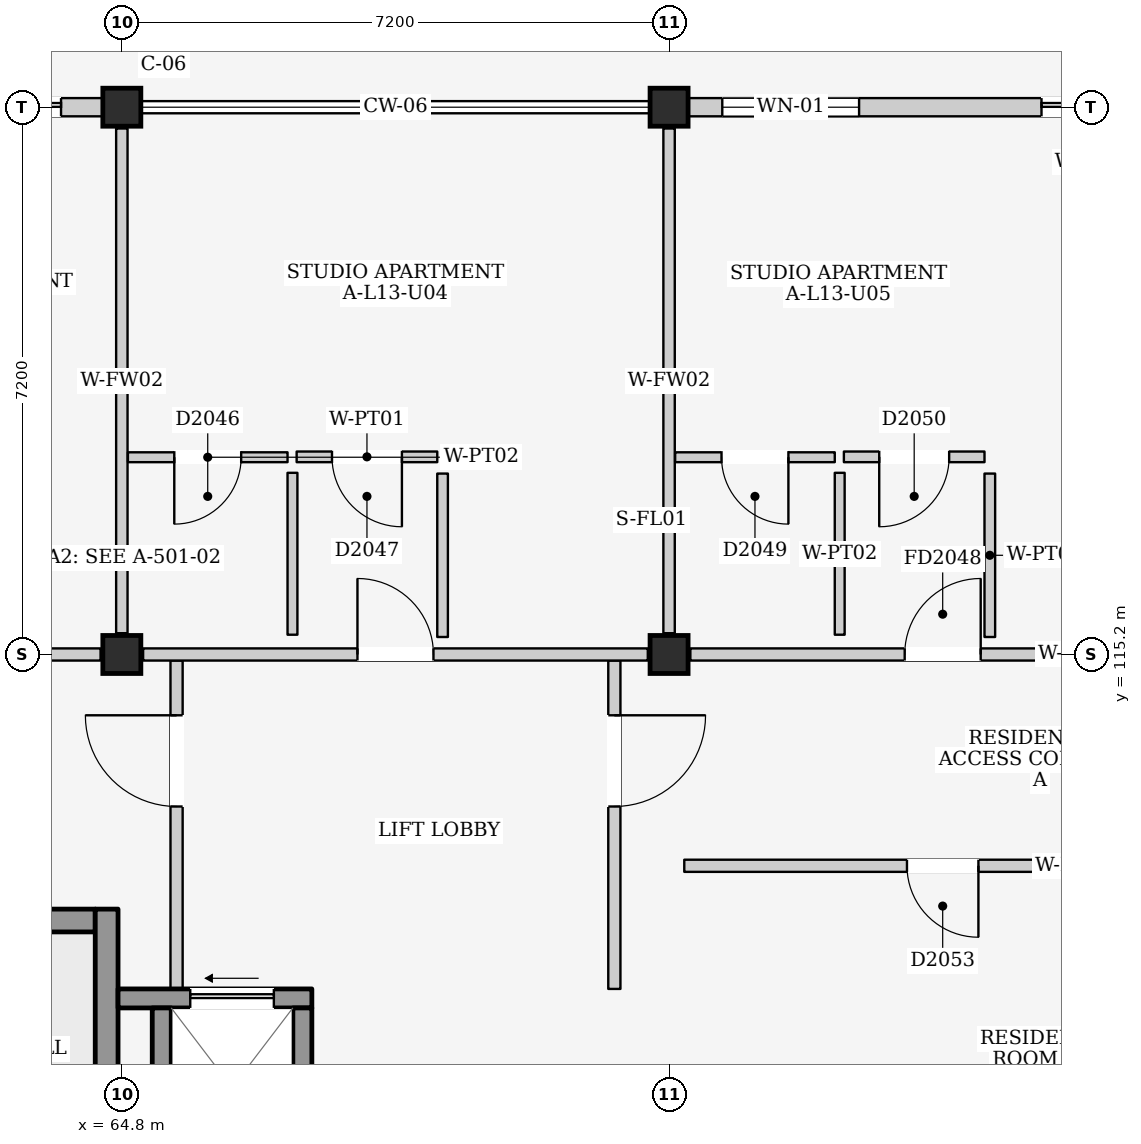
"""IFC4 building model, lengths in metres.
Left out: names, types, materials, properties, quantities, classifications, styles, units other than length and angle.
Written with IfcOpenShell. Run it as: python <this file> out.ifc"""

import sys

from ifc_helpers import new_model, si_unit, direction, frame, frame_2d, origin, origin_2d, place, context, subcontext, project, spatial, rectangle, extrude, element, fill, save


model = new_model("IFC4")
c1 = context("Model", 3, precision=1e-05, world=origin(), true_north=direction((0.0, 1.0)))
c2 = subcontext(c1, "Body", "Model", "MODEL_VIEW")
j1 = project(units=[si_unit("LENGTHUNIT", "METRE"), si_unit("PLANEANGLEUNIT", "RADIAN")], contexts=[c1])
p1 = place(None, origin())
s1 = spatial("IfcSite", under=j1, at=p1, CompositionType="ELEMENT")
p2 = place(p1, origin())
s2 = spatial("IfcBuilding", under=s1, at=p2, CompositionType="ELEMENT")
p3 = place(p2, frame((0.0, 0.0, 44.4)))
s3 = spatial("IfcBuildingStorey", under=s2, at=p3, CompositionType="ELEMENT", Elevation=44.4)
for number, where, z_axis, x_axis in (
    (1, (64.8, 115.2, 0.0), (0.0, 0.0, 1.0), (1.0, 0.0, 0.0)),
    (2, (64.8, 122.4, 0.0), (0.0, 0.0, 1.0), (1.0, 0.0, 0.0)),
    (3, (72.0, 115.2, 0.0), (0.0, 0.0, 1.0), (1.0, 0.0, 0.0)),
    (4, (72.0, 122.4, 0.0), (0.0, 0.0, 1.0), (1.0, 0.0, 0.0)),
):
    element("IfcColumn", number, at=place(p3, frame(where, z_axis=z_axis, x_axis=x_axis)), inside=s3, PredefinedType="COLUMN", context=c2, shape_type="SweptSolid", body=[
        extrude(rectangle(XDim=0.5, YDim=0.5, at=origin_2d()), origin(), (0.0, 0.0, 1.0), 3.3),
    ])
p4 = place(p3, frame((57.85, 122.4, 0.0), z_axis=(0.0, 0.0, 1.0), x_axis=(1.0, 0.0, 0.0)))
e5 = element("IfcWall", 5, at=p4, inside=s3, PredefinedType="ELEMENTEDWALL", context=c2, shape_type="SweptSolid", body=[
    extrude(rectangle(XDim=6.7, YDim=0.24, at=frame_2d((3.35, 0.0))), origin(), (0.0, 0.0, 1.0), 2.615),
])
p5 = place(p4, frame((4.35, 0.0, 0.0)))
e6 = element("IfcOpeningElement", 6, at=p5, cuts=e5, PredefinedType="OPENING", context=c2, shape_type="SweptSolid", body=[
    extrude(rectangle(XDim=1.8, YDim=2.12, at=frame_2d((0.9, 1.06))), frame((0.0, 0.135, 0.0), z_axis=(0.0, -1.0, 0.0), x_axis=(1.0, 0.0, 0.0)), (0.0, 0.0, 1.0), 0.27),
])
p6 = place(p4, frame((0.45, 0.0, 0.9)))
e7 = element("IfcOpeningElement", 7, at=p6, cuts=e5, PredefinedType="OPENING", context=c2, shape_type="SweptSolid", body=[
    extrude(rectangle(XDim=2.05, YDim=1.6, at=frame_2d((1.025, 0.8))), frame((0.0, 0.135, 0.0), z_axis=(0.0, -1.0, 0.0), x_axis=(1.0, 0.0, 0.0)), (0.0, 0.0, 1.0), 0.27),
])
p7 = place(p3, frame((72.25, 122.4, 0.0), z_axis=(0.0, 0.0, 1.0), x_axis=(1.0, 0.0, 0.0)))
e8 = element("IfcWall", 8, at=p7, inside=s3, PredefinedType="ELEMENTEDWALL", context=c2, shape_type="SweptSolid", body=[
    extrude(rectangle(XDim=6.7, YDim=0.24, at=frame_2d((3.35, 0.0))), origin(), (0.0, 0.0, 1.0), 2.615),
])
p8 = place(p7, frame((4.65, 0.0, 0.0)))
e9 = element("IfcOpeningElement", 9, at=p8, cuts=e8, PredefinedType="OPENING", context=c2, shape_type="SweptSolid", body=[
    extrude(rectangle(XDim=1.5, YDim=2.12, at=frame_2d((0.75, 1.06))), frame((0.0, 0.135, 0.0), z_axis=(0.0, -1.0, 0.0), x_axis=(1.0, 0.0, 0.0)), (0.0, 0.0, 1.0), 0.27),
])
p9 = place(p7, frame((0.45, 0.0, 0.9)))
e10 = element("IfcOpeningElement", 10, at=p9, cuts=e8, PredefinedType="OPENING", context=c2, shape_type="SweptSolid", body=[
    extrude(rectangle(XDim=1.8, YDim=1.5, at=frame_2d((0.9, 0.75))), frame((0.0, 0.135, 0.0), z_axis=(0.0, -1.0, 0.0), x_axis=(1.0, 0.0, 0.0)), (0.0, 0.0, 1.0), 0.27),
])
p10 = place(p3, frame((57.95, 111.7, 0.0), z_axis=(0.0, 0.0, 1.0), x_axis=(1.0, 0.0, 0.0)))
e11 = element("IfcWall", 11, at=p10, inside=s3, PredefinedType="SHEAR", context=c2, shape_type="SweptSolid", body=[
    extrude(rectangle(XDim=6.5, YDim=0.3, at=frame_2d((3.25, 0.0))), origin(), (0.0, 0.0, 1.0), 3.08),
])
p11 = place(p10, frame((0.18, 0.0, 0.0)))
e12 = element("IfcOpeningElement", 12, at=p11, cuts=e11, PredefinedType="OPENING", context=c2, shape_type="SweptSolid", body=[
    extrude(rectangle(XDim=1.15, YDim=2.2, at=frame_2d((0.575, 1.1))), frame((0.0, 0.165, 0.0), z_axis=(0.0, -1.0, 0.0), x_axis=(1.0, 0.0, 0.0)), (0.0, 0.0, 1.0), 0.33),
])
p12 = place(p3, frame((64.6, 108.15, 0.0), z_axis=(0.0, 0.0, 1.0), x_axis=(0.0, 1.0, 0.0)))
e13 = element("IfcWall", 13, at=p12, inside=s3, PredefinedType="SHEAR", context=c2, shape_type="SweptSolid", body=[
    extrude(rectangle(XDim=3.7, YDim=0.3, at=frame_2d((1.85, 0.0))), origin(), (0.0, 0.0, 1.0), 3.08),
])
p13 = place(p3, frame((65.52, 110.8, 0.0), z_axis=(0.0, 0.0, 1.0), x_axis=(0.0, 1.0, 0.0)))
e14 = element("IfcWall", 14, at=p13, inside=s3, PredefinedType="PARTITIONING", context=c2, shape_type="SweptSolid", body=[
    extrude(rectangle(XDim=4.32, YDim=0.16, at=frame_2d((2.16, 0.0))), origin(), (0.0, 0.0, 1.0), 3.08),
])
p14 = place(p13, frame((2.4, 0.0, 0.0)))
e15 = element("IfcOpeningElement", 15, at=p14, cuts=e14, PredefinedType="OPENING", context=c2, shape_type="SweptSolid", body=[
    extrude(rectangle(XDim=1.2, YDim=2.2, at=frame_2d((0.6, 1.1))), frame((0.0, 0.095, 0.0), z_axis=(0.0, -1.0, 0.0), x_axis=(1.0, 0.0, 0.0)), (0.0, 0.0, 1.0), 0.19),
])
p15 = place(p3, frame((71.28, 110.8, 0.0), z_axis=(0.0, 0.0, 1.0), x_axis=(0.0, 1.0, 0.0)))
e16 = element("IfcWall", 16, at=p15, inside=s3, PredefinedType="PARTITIONING", context=c2, shape_type="SweptSolid", body=[
    extrude(rectangle(XDim=4.32, YDim=0.16, at=frame_2d((2.16, 0.0))), origin(), (0.0, 0.0, 1.0), 3.08),
])
p16 = place(p15, frame((2.4, 0.0, 0.0)))
e17 = element("IfcOpeningElement", 17, at=p16, cuts=e16, PredefinedType="OPENING", context=c2, shape_type="SweptSolid", body=[
    extrude(rectangle(XDim=1.2, YDim=2.2, at=frame_2d((0.6, 1.1))), frame((0.0, 0.095, 0.0), z_axis=(0.0, -1.0, 0.0), x_axis=(1.0, 0.0, 0.0)), (0.0, 0.0, 1.0), 0.19),
])
p17 = place(p3, frame((64.75, 110.675, 0.0), z_axis=(0.0, 0.0, 1.0), x_axis=(1.0, 0.0, 0.0)))
e18 = element("IfcWall", 18, at=p17, inside=s3, PredefinedType="SHEAR", context=c2, shape_type="SweptSolid", body=[
    extrude(rectangle(XDim=2.55, YDim=0.25, at=frame_2d((1.275, 0.0))), origin(), (0.0, 0.0, 1.0), 3.08),
])
p18 = place(p17, frame((0.95, 0.0, 0.0)))
e19 = element("IfcOpeningElement", 19, at=p18, cuts=e18, PredefinedType="OPENING", context=c2, shape_type="SweptSolid", body=[
    extrude(rectangle(XDim=1.1, YDim=2.15, at=frame_2d((0.55, 1.075))), frame((0.0, 0.14, 0.0), z_axis=(0.0, -1.0, 0.0), x_axis=(1.0, 0.0, 0.0)), (0.0, 0.0, 1.0), 0.28),
])
for number, where, z_axis, x_axis in (
    (20, (65.325, 108.45, 0.0), (0.0, 0.0, 1.0), (0.0, 1.0, 0.0)),
    (21, (67.175, 108.45, 0.0), (0.0, 0.0, 1.0), (0.0, 1.0, 0.0)),
):
    element("IfcWall", number, at=place(p3, frame(where, z_axis=z_axis, x_axis=x_axis)), inside=s3, PredefinedType="SHEAR", context=c2, shape_type="SweptSolid", body=[
        extrude(rectangle(XDim=2.1, YDim=0.25, at=frame_2d((1.05, 0.0))), origin(), (0.0, 0.0, 1.0), 3.08),
    ])
p19 = place(p3, frame((57.88, 115.2, 0.0), z_axis=(0.0, 0.0, 1.0), x_axis=(1.0, 0.0, 0.0)))
e22 = element("IfcWall", 22, at=p19, inside=s3, PredefinedType="PARTITIONING", context=c2, shape_type="SweptSolid", body=[
    extrude(rectangle(XDim=6.64, YDim=0.16, at=frame_2d((3.32, 0.0))), origin(), (0.0, 0.0, 1.0), 2.415),
])
p20 = place(p19, frame((2.82, 0.0, 0.0)))
e23 = element("IfcOpeningElement", 23, at=p20, cuts=e22, PredefinedType="OPENING", context=c2, shape_type="SweptSolid", body=[
    extrude(rectangle(XDim=1.0, YDim=2.15, at=frame_2d((0.5, 1.075))), frame((0.0, 0.095, 0.0), z_axis=(0.0, -1.0, 0.0), x_axis=(1.0, 0.0, 0.0)), (0.0, 0.0, 1.0), 0.19),
])
p21 = place(p3, frame((64.8, 115.48, 0.0), z_axis=(0.0, 0.0, 1.0), x_axis=(0.0, 1.0, 0.0)))
e24 = element("IfcWall", 24, at=p21, inside=s3, PredefinedType="PARTITIONING", context=c2, shape_type="SweptSolid", body=[
    extrude(rectangle(XDim=6.64, YDim=0.15, at=frame_2d((3.32, 0.0))), origin(), (0.0, 0.0, 1.0), 2.565),
])
p22 = place(p3, frame((65.08, 115.2, 0.0), z_axis=(0.0, 0.0, 1.0), x_axis=(1.0, 0.0, 0.0)))
e25 = element("IfcWall", 25, at=p22, inside=s3, PredefinedType="PARTITIONING", context=c2, shape_type="SweptSolid", body=[
    extrude(rectangle(XDim=6.64, YDim=0.16, at=frame_2d((3.32, 0.0))), origin(), (0.0, 0.0, 1.0), 2.415),
])
p23 = place(p22, frame((2.82, 0.0, 0.0)))
e26 = element("IfcOpeningElement", 26, at=p23, cuts=e25, PredefinedType="OPENING", context=c2, shape_type="SweptSolid", body=[
    extrude(rectangle(XDim=1.0, YDim=2.15, at=frame_2d((0.5, 1.075))), frame((0.0, 0.095, 0.0), z_axis=(0.0, -1.0, 0.0), x_axis=(1.0, 0.0, 0.0)), (0.0, 0.0, 1.0), 0.19),
])
p24 = place(p3, frame((72.0, 115.48, 0.0), z_axis=(0.0, 0.0, 1.0), x_axis=(0.0, 1.0, 0.0)))
e27 = element("IfcWall", 27, at=p24, inside=s3, PredefinedType="PARTITIONING", context=c2, shape_type="SweptSolid", body=[
    extrude(rectangle(XDim=6.64, YDim=0.15, at=frame_2d((3.32, 0.0))), origin(), (0.0, 0.0, 1.0), 2.565),
])
p25 = place(p3, frame((64.88, 117.795, 0.0), z_axis=(0.0, 0.0, 1.0), x_axis=(1.0, 0.0, 0.0)))
e28 = element("IfcWall", 28, at=p25, inside=s3, PredefinedType="PARTITIONING", context=c2, shape_type="SweptSolid", body=[
    extrude(rectangle(XDim=2.1, YDim=0.13, at=frame_2d((1.05, 0.0))), origin(), (0.0, 0.0, 1.0), 3.08),
])
p26 = place(p25, frame((0.61, 0.0, 0.0)))
e29 = element("IfcOpeningElement", 29, at=p26, cuts=e28, PredefinedType="OPENING", context=c2, shape_type="SweptSolid", body=[
    extrude(rectangle(XDim=0.88, YDim=2.1, at=frame_2d((0.44, 1.05))), frame((0.0, 0.08, 0.0), z_axis=(0.0, -1.0, 0.0), x_axis=(1.0, 0.0, 0.0)), (0.0, 0.0, 1.0), 0.16),
])
p27 = place(p3, frame((67.045, 115.46, 0.0), z_axis=(0.0, 0.0, 1.0), x_axis=(0.0, 1.0, 0.0)))
e30 = element("IfcWall", 30, at=p27, inside=s3, PredefinedType="PARTITIONING", context=c2, shape_type="SweptSolid", body=[
    extrude(rectangle(XDim=2.13, YDim=0.13, at=frame_2d((1.065, 0.0))), origin(), (0.0, 0.0, 1.0), 3.08),
])
p28 = place(p3, frame((67.1, 117.8, 0.0), z_axis=(0.0, 0.0, 1.0), x_axis=(1.0, 0.0, 0.0)))
e31 = element("IfcWall", 31, at=p28, inside=s3, PredefinedType="PARTITIONING", context=c2, shape_type="SweptSolid", body=[
    extrude(rectangle(XDim=1.85, YDim=0.14, at=frame_2d((0.925, 0.0))), origin(), (0.0, 0.0, 1.0), 3.08),
])
p29 = place(p28, frame((0.465, 0.0, 0.0)))
e32 = element("IfcOpeningElement", 32, at=p29, cuts=e31, PredefinedType="OPENING", context=c2, shape_type="SweptSolid", body=[
    extrude(rectangle(XDim=0.92, YDim=2.1, at=frame_2d((0.46, 1.05))), frame((0.0, 0.085, 0.0), z_axis=(0.0, -1.0, 0.0), x_axis=(1.0, 0.0, 0.0)), (0.0, 0.0, 1.0), 0.17),
])
p30 = place(p3, frame((69.02, 115.43, 0.0), z_axis=(0.0, 0.0, 1.0), x_axis=(0.0, 1.0, 0.0)))
e33 = element("IfcWall", 33, at=p30, inside=s3, PredefinedType="PARTITIONING", context=c2, shape_type="SweptSolid", body=[
    extrude(rectangle(XDim=2.15, YDim=0.14, at=frame_2d((1.075, 0.0))), origin(), (0.0, 0.0, 1.0), 3.08),
])
p31 = place(p3, frame((72.28, 115.2, 0.0), z_axis=(0.0, 0.0, 1.0), x_axis=(1.0, 0.0, 0.0)))
e34 = element("IfcWall", 34, at=p31, inside=s3, PredefinedType="PARTITIONING", context=c2, shape_type="SweptSolid", body=[
    extrude(rectangle(XDim=6.64, YDim=0.16, at=frame_2d((3.32, 0.0))), origin(), (0.0, 0.0, 1.0), 2.415),
])
p32 = place(p31, frame((2.82, 0.0, 0.0)))
e35 = element("IfcOpeningElement", 35, at=p32, cuts=e34, PredefinedType="OPENING", context=c2, shape_type="SweptSolid", body=[
    extrude(rectangle(XDim=1.0, YDim=2.15, at=frame_2d((0.5, 1.075))), frame((0.0, 0.095, 0.0), z_axis=(0.0, -1.0, 0.0), x_axis=(1.0, 0.0, 0.0)), (0.0, 0.0, 1.0), 0.19),
])
p33 = place(p3, frame((72.08, 117.795, 0.0), z_axis=(0.0, 0.0, 1.0), x_axis=(1.0, 0.0, 0.0)))
e36 = element("IfcWall", 36, at=p33, inside=s3, PredefinedType="PARTITIONING", context=c2, shape_type="SweptSolid", body=[
    extrude(rectangle(XDim=2.1, YDim=0.13, at=frame_2d((1.05, 0.0))), origin(), (0.0, 0.0, 1.0), 3.08),
])
p34 = place(p33, frame((0.61, 0.0, 0.0)))
e37 = element("IfcOpeningElement", 37, at=p34, cuts=e36, PredefinedType="OPENING", context=c2, shape_type="SweptSolid", body=[
    extrude(rectangle(XDim=0.88, YDim=2.1, at=frame_2d((0.44, 1.05))), frame((0.0, 0.08, 0.0), z_axis=(0.0, -1.0, 0.0), x_axis=(1.0, 0.0, 0.0)), (0.0, 0.0, 1.0), 0.16),
])
p35 = place(p3, frame((74.245, 115.46, 0.0), z_axis=(0.0, 0.0, 1.0), x_axis=(0.0, 1.0, 0.0)))
e38 = element("IfcWall", 38, at=p35, inside=s3, PredefinedType="PARTITIONING", context=c2, shape_type="SweptSolid", body=[
    extrude(rectangle(XDim=2.13, YDim=0.13, at=frame_2d((1.065, 0.0))), origin(), (0.0, 0.0, 1.0), 3.08),
])
p36 = place(p3, frame((74.3, 117.8, 0.0), z_axis=(0.0, 0.0, 1.0), x_axis=(1.0, 0.0, 0.0)))
e39 = element("IfcWall", 39, at=p36, inside=s3, PredefinedType="PARTITIONING", context=c2, shape_type="SweptSolid", body=[
    extrude(rectangle(XDim=1.85, YDim=0.14, at=frame_2d((0.925, 0.0))), origin(), (0.0, 0.0, 1.0), 3.08),
])
p37 = place(p36, frame((0.465, 0.0, 0.0)))
e40 = element("IfcOpeningElement", 40, at=p37, cuts=e39, PredefinedType="OPENING", context=c2, shape_type="SweptSolid", body=[
    extrude(rectangle(XDim=0.92, YDim=2.1, at=frame_2d((0.46, 1.05))), frame((0.0, 0.085, 0.0), z_axis=(0.0, -1.0, 0.0), x_axis=(1.0, 0.0, 0.0)), (0.0, 0.0, 1.0), 0.17),
])
p38 = place(p3, frame((76.22, 115.43, 0.0), z_axis=(0.0, 0.0, 1.0), x_axis=(0.0, 1.0, 0.0)))
e41 = element("IfcWall", 41, at=p38, inside=s3, PredefinedType="PARTITIONING", context=c2, shape_type="SweptSolid", body=[
    extrude(rectangle(XDim=2.15, YDim=0.14, at=frame_2d((1.075, 0.0))), origin(), (0.0, 0.0, 1.0), 3.08),
])
p39 = place(p3, frame((72.2, 112.42, 0.0), z_axis=(0.0, 0.0, 1.0), x_axis=(1.0, 0.0, 0.0)))
e42 = element("IfcWall", 42, at=p39, inside=s3, PredefinedType="PARTITIONING", context=c2, shape_type="SweptSolid", body=[
    extrude(rectangle(XDim=6.8, YDim=0.16, at=frame_2d((3.4, 0.0))), origin(), (0.0, 0.0, 1.0), 3.08),
])
p40 = place(p39, frame((2.93, 0.0, 0.0)))
e43 = element("IfcOpeningElement", 43, at=p40, cuts=e42, PredefinedType="OPENING", context=c2, shape_type="SweptSolid", body=[
    extrude(rectangle(XDim=0.94, YDim=2.12, at=frame_2d((0.47, 1.06))), frame((0.0, 0.095, 0.0), z_axis=(0.0, -1.0, 0.0), x_axis=(1.0, 0.0, 0.0)), (0.0, 0.0, 1.0), 0.19),
])
p41 = place(p5, frame((1.8, 0.0, 0.0), z_axis=(0.0, 0.0, 1.0), x_axis=(-1.0, 0.0, 0.0)))
e44 = element("IfcDoor", 44, at=p41, inside=s3, OperationType="SLIDING_TO_LEFT", PredefinedType="DOOR", context=c2, shape_type="SweptSolid", body=[
    extrude(rectangle(XDim=1.8, YDim=2.12, at=frame_2d((0.9, 1.06))), frame((0.0, 0.025, 0.0), z_axis=(0.0, -1.0, 0.0), x_axis=(1.0, 0.0, 0.0)), (0.0, 0.0, 1.0), 0.05),
])
fill(e6, e44)
p42 = place(p8, frame((1.5, 0.0, 0.0), z_axis=(0.0, 0.0, 1.0), x_axis=(-1.0, 0.0, 0.0)))
e45 = element("IfcDoor", 45, at=p42, inside=s3, OperationType="SLIDING_TO_LEFT", PredefinedType="DOOR", context=c2, shape_type="SweptSolid", body=[
    extrude(rectangle(XDim=1.5, YDim=2.12, at=frame_2d((0.75, 1.06))), frame((0.0, 0.025, 0.0), z_axis=(0.0, -1.0, 0.0), x_axis=(1.0, 0.0, 0.0)), (0.0, 0.0, 1.0), 0.05),
])
fill(e9, e45)
p43 = place(p9, origin())
e46 = element("IfcWindow", 46, at=p43, inside=s3, PartitioningType="DOUBLE_PANEL_VERTICAL", PredefinedType="WINDOW", context=c2, shape_type="SweptSolid", body=[
    extrude(rectangle(XDim=1.8, YDim=1.5, at=frame_2d((0.9, 0.75))), frame((0.0, 0.03, 0.0), z_axis=(0.0, -1.0, 0.0), x_axis=(1.0, 0.0, 0.0)), (0.0, 0.0, 1.0), 0.06),
])
fill(e10, e46)
p44 = place(p14, origin())
e47 = element("IfcDoor", 47, at=p44, inside=s3, OperationType="SINGLE_SWING_RIGHT", PredefinedType="DOOR", context=c2, shape_type="SweptSolid", body=[
    extrude(rectangle(XDim=1.2, YDim=2.2, at=frame_2d((0.6, 1.1))), frame((0.0, 0.025, 0.0), z_axis=(0.0, -1.0, 0.0), x_axis=(1.0, 0.0, 0.0)), (0.0, 0.0, 1.0), 0.05),
])
fill(e15, e47)
p45 = place(p16, frame((1.2, 0.0, 0.0), z_axis=(0.0, 0.0, 1.0), x_axis=(-1.0, 0.0, 0.0)))
e48 = element("IfcDoor", 48, at=p45, inside=s3, OperationType="SINGLE_SWING_LEFT", PredefinedType="DOOR", context=c2, shape_type="SweptSolid", body=[
    extrude(rectangle(XDim=1.2, YDim=2.2, at=frame_2d((0.6, 1.1))), frame((0.0, 0.025, 0.0), z_axis=(0.0, -1.0, 0.0), x_axis=(1.0, 0.0, 0.0)), (0.0, 0.0, 1.0), 0.05),
])
fill(e17, e48)
p46 = place(p18, origin())
e49 = element("IfcDoor", 49, at=p46, inside=s3, OperationType="SLIDING_TO_LEFT", PredefinedType="DOOR", context=c2, shape_type="SweptSolid", body=[
    extrude(rectangle(XDim=1.1, YDim=2.15, at=frame_2d((0.55, 1.075))), frame((0.0, 0.025, 0.0), z_axis=(0.0, -1.0, 0.0), x_axis=(1.0, 0.0, 0.0)), (0.0, 0.0, 1.0), 0.05),
])
fill(e19, e49)
p47 = place(p23, origin())
e50 = element("IfcDoor", 50, at=p47, inside=s3, OperationType="SINGLE_SWING_LEFT", PredefinedType="DOOR", context=c2, shape_type="SweptSolid", body=[
    extrude(rectangle(XDim=1.0, YDim=2.15, at=frame_2d((0.5, 1.075))), frame((0.0, 0.025, 0.0), z_axis=(0.0, -1.0, 0.0), x_axis=(1.0, 0.0, 0.0)), (0.0, 0.0, 1.0), 0.05),
])
fill(e26, e50)
p48 = place(p26, frame((0.88, 0.0, 0.0), z_axis=(0.0, 0.0, 1.0), x_axis=(-1.0, 0.0, 0.0)))
e51 = element("IfcDoor", 51, at=p48, inside=s3, OperationType="SINGLE_SWING_RIGHT", PredefinedType="DOOR", context=c2, shape_type="SweptSolid", body=[
    extrude(rectangle(XDim=0.88, YDim=2.1, at=frame_2d((0.44, 1.05))), frame((0.0, 0.025, 0.0), z_axis=(0.0, -1.0, 0.0), x_axis=(1.0, 0.0, 0.0)), (0.0, 0.0, 1.0), 0.05),
])
fill(e29, e51)
p49 = place(p29, frame((0.92, 0.0, 0.0), z_axis=(0.0, 0.0, 1.0), x_axis=(-1.0, 0.0, 0.0)))
e52 = element("IfcDoor", 52, at=p49, inside=s3, OperationType="SINGLE_SWING_LEFT", PredefinedType="DOOR", context=c2, shape_type="SweptSolid", body=[
    extrude(rectangle(XDim=0.92, YDim=2.1, at=frame_2d((0.46, 1.05))), frame((0.0, 0.025, 0.0), z_axis=(0.0, -1.0, 0.0), x_axis=(1.0, 0.0, 0.0)), (0.0, 0.0, 1.0), 0.05),
])
fill(e32, e52)
p50 = place(p32, origin())
e53 = element("IfcDoor", 53, at=p50, inside=s3, OperationType="SINGLE_SWING_RIGHT", PredefinedType="DOOR", context=c2, shape_type="SweptSolid", body=[
    extrude(rectangle(XDim=1.0, YDim=2.15, at=frame_2d((0.5, 1.075))), frame((0.0, 0.025, 0.0), z_axis=(0.0, -1.0, 0.0), x_axis=(1.0, 0.0, 0.0)), (0.0, 0.0, 1.0), 0.05),
])
fill(e35, e53)
p51 = place(p34, frame((0.88, 0.0, 0.0), z_axis=(0.0, 0.0, 1.0), x_axis=(-1.0, 0.0, 0.0)))
e54 = element("IfcDoor", 54, at=p51, inside=s3, OperationType="SINGLE_SWING_LEFT", PredefinedType="DOOR", context=c2, shape_type="SweptSolid", body=[
    extrude(rectangle(XDim=0.88, YDim=2.1, at=frame_2d((0.44, 1.05))), frame((0.0, 0.025, 0.0), z_axis=(0.0, -1.0, 0.0), x_axis=(1.0, 0.0, 0.0)), (0.0, 0.0, 1.0), 0.05),
])
fill(e37, e54)
p52 = place(p37, frame((0.92, 0.0, 0.0), z_axis=(0.0, 0.0, 1.0), x_axis=(-1.0, 0.0, 0.0)))
e55 = element("IfcDoor", 55, at=p52, inside=s3, OperationType="SINGLE_SWING_RIGHT", PredefinedType="DOOR", context=c2, shape_type="SweptSolid", body=[
    extrude(rectangle(XDim=0.92, YDim=2.1, at=frame_2d((0.46, 1.05))), frame((0.0, 0.025, 0.0), z_axis=(0.0, -1.0, 0.0), x_axis=(1.0, 0.0, 0.0)), (0.0, 0.0, 1.0), 0.05),
])
fill(e40, e55)
p53 = place(p40, frame((0.94, 0.0, 0.0), z_axis=(0.0, 0.0, 1.0), x_axis=(-1.0, 0.0, 0.0)))
e56 = element("IfcDoor", 56, at=p53, inside=s3, OperationType="SINGLE_SWING_LEFT", PredefinedType="DOOR", context=c2, shape_type="SweptSolid", body=[
    extrude(rectangle(XDim=0.94, YDim=2.12, at=frame_2d((0.47, 1.06))), frame((0.0, 0.025, 0.0), z_axis=(0.0, -1.0, 0.0), x_axis=(1.0, 0.0, 0.0)), (0.0, 0.0, 1.0), 0.05),
])
fill(e43, e56)
save(model, sys.argv[1])
